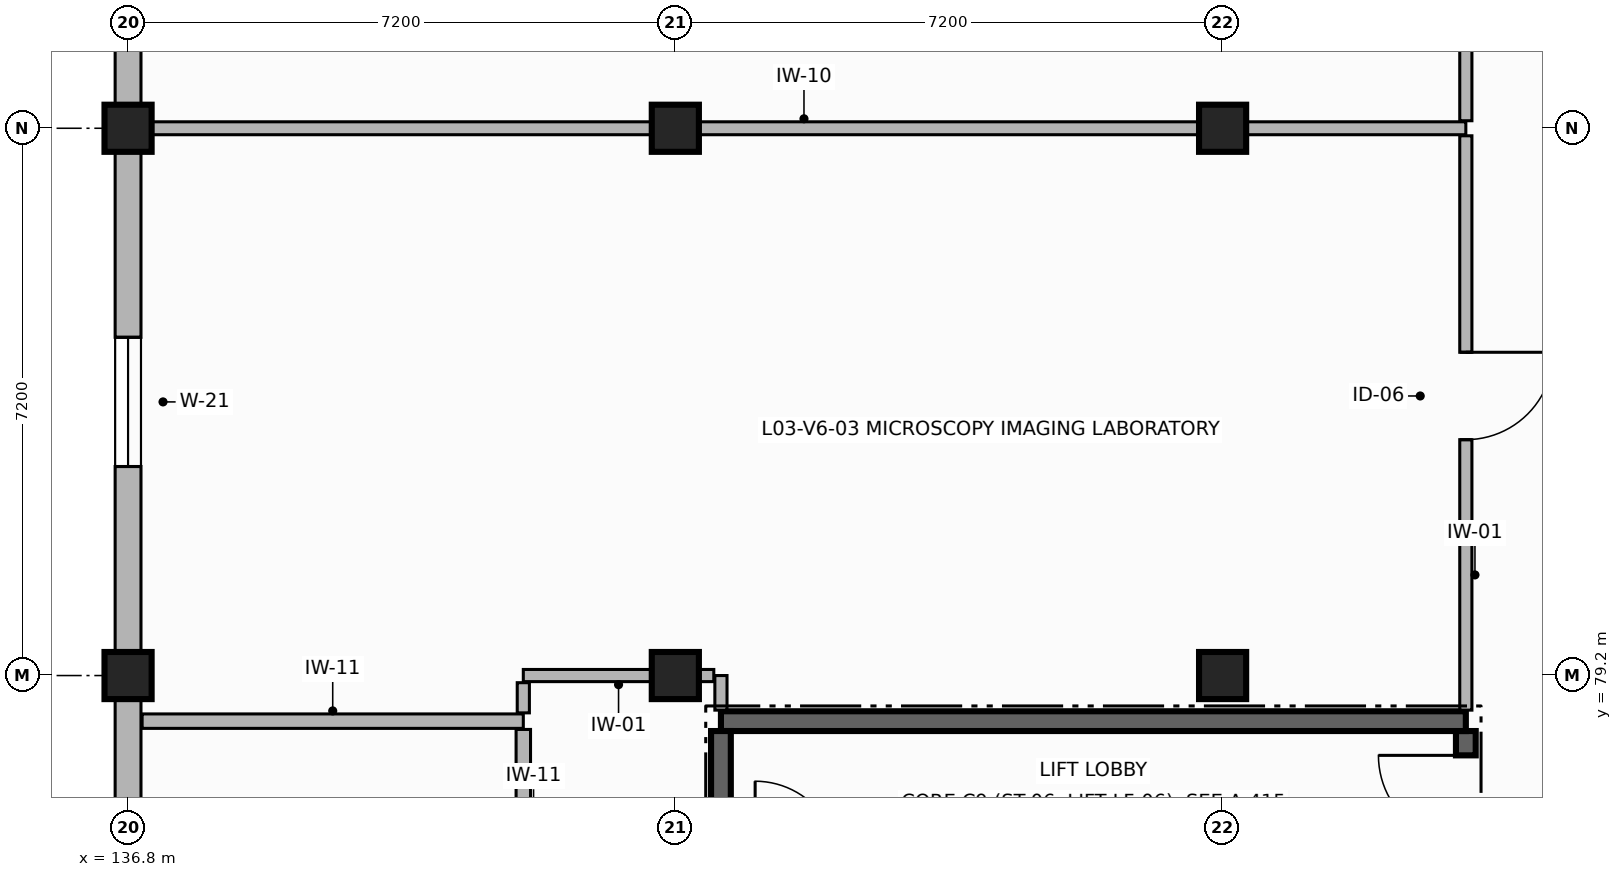
"""IFC4 building model, lengths in metres.
Left out: names, types, materials, properties, quantities, classifications, styles, units other than length and angle.
Written with IfcOpenShell. Run it as: python <this file> out.ifc"""

import sys

from ifc_helpers import new_model, si_unit, direction, frame, frame_2d, origin, origin_2d, place, context, subcontext, project, spatial, rectangle, extrude, element, fill, save


model = new_model("IFC4")
c1 = context("Model", 3, precision=1e-05, world=origin(), true_north=direction((0.0, 1.0)))
c2 = subcontext(c1, "Body", "Model", "MODEL_VIEW")
j1 = project(units=[si_unit("LENGTHUNIT", "METRE"), si_unit("PLANEANGLEUNIT", "RADIAN")], contexts=[c1])
p1 = place(None, origin())
s1 = spatial("IfcSite", under=j1, at=p1, CompositionType="ELEMENT")
p2 = place(p1, origin())
s2 = spatial("IfcBuilding", under=s1, at=p2, CompositionType="ELEMENT")
p3 = place(p2, frame((0.0, 0.0, 12.3)))
s3 = spatial("IfcBuildingStorey", under=s2, at=p3, CompositionType="ELEMENT", Elevation=12.3)
for number, where, z_axis, x_axis in (
    (1, (136.8, 79.2, 0.0), (0.0, 0.0, 1.0), (1.0, 0.0, 0.0)),
    (2, (136.8, 86.4, 0.0), (0.0, 0.0, 1.0), (1.0, 0.0, 0.0)),
    (3, (144.0, 79.2, 0.0), (0.0, 0.0, 1.0), (1.0, 0.0, 0.0)),
    (4, (144.0, 86.4, 0.0), (0.0, 0.0, 1.0), (1.0, 0.0, 0.0)),
    (5, (151.2, 79.2, 0.0), (0.0, 0.0, 1.0), (1.0, 0.0, 0.0)),
    (6, (151.2, 86.4, 0.0), (0.0, 0.0, 1.0), (1.0, 0.0, 0.0)),
):
    element("IfcColumn", number, at=place(p3, frame(where, z_axis=z_axis, x_axis=x_axis)), inside=s3, PredefinedType="COLUMN", context=c2, shape_type="SweptSolid", body=[
        extrude(rectangle(XDim=0.62, YDim=0.62, at=origin_2d()), origin(), (0.0, 0.0, 1.0), 3.38),
    ])
p4 = place(p3, frame((136.8, 93.6, 0.0), z_axis=(0.0, 0.0, 1.0), x_axis=(0.0, -1.0, 0.0)))
e7 = element("IfcWall", 7, at=p4, inside=s3, PredefinedType="SOLIDWALL", context=c2, shape_type="SweptSolid", body=[
    extrude(rectangle(XDim=7.2, YDim=0.34, at=frame_2d((3.6, 0.0))), origin(), (0.0, 0.0, 1.0), 2.71),
])
p5 = place(p4, frame((2.75, 0.0, 0.85)))
e8 = element("IfcOpeningElement", 8, at=p5, cuts=e7, PredefinedType="OPENING", context=c2, shape_type="SweptSolid", body=[
    extrude(rectangle(XDim=1.7, YDim=1.65, at=frame_2d((0.85, 0.825))), frame((0.0, 0.18, 0.0), z_axis=(0.0, -1.0, 0.0), x_axis=(1.0, 0.0, 0.0)), (0.0, 0.0, 1.0), 0.36),
])
p6 = place(p3, frame((136.8, 86.4, 0.0), z_axis=(0.0, 0.0, 1.0), x_axis=(0.0, -1.0, 0.0)))
e9 = element("IfcWall", 9, at=p6, inside=s3, PredefinedType="SOLIDWALL", context=c2, shape_type="SweptSolid", body=[
    extrude(rectangle(XDim=7.2, YDim=0.34, at=frame_2d((3.6, 0.0))), origin(), (0.0, 0.0, 1.0), 2.71),
])
p7 = place(p6, frame((2.75, 0.0, 0.85)))
e10 = element("IfcOpeningElement", 10, at=p7, cuts=e9, PredefinedType="OPENING", context=c2, shape_type="SweptSolid", body=[
    extrude(rectangle(XDim=1.7, YDim=1.65, at=frame_2d((0.85, 0.825))), frame((0.0, 0.18, 0.0), z_axis=(0.0, -1.0, 0.0), x_axis=(1.0, 0.0, 0.0)), (0.0, 0.0, 1.0), 0.36),
])
p8 = place(p3, frame((136.8, 79.2, 0.0), z_axis=(0.0, 0.0, 1.0), x_axis=(0.0, -1.0, 0.0)))
e11 = element("IfcWall", 11, at=p8, inside=s3, PredefinedType="SOLIDWALL", context=c2, shape_type="SweptSolid", body=[
    extrude(rectangle(XDim=7.2, YDim=0.34, at=frame_2d((3.6, 0.0))), origin(), (0.0, 0.0, 1.0), 2.71),
])
p9 = place(p8, frame((2.65, 0.0, 0.85)))
e12 = element("IfcOpeningElement", 12, at=p9, cuts=e11, PredefinedType="OPENING", context=c2, shape_type="SweptSolid", body=[
    extrude(rectangle(XDim=1.7, YDim=1.65, at=frame_2d((0.85, 0.825))), frame((0.0, 0.18, 0.0), z_axis=(0.0, -1.0, 0.0), x_axis=(1.0, 0.0, 0.0)), (0.0, 0.0, 1.0), 0.36),
])
p10 = place(p3, frame((154.4, 72.93, 0.0), z_axis=(0.0, 0.0, 1.0), x_axis=(0.0, 1.0, 0.0)))
e13 = element("IfcWall", 13, at=p10, inside=s3, PredefinedType="SHEAR", context=c2, shape_type="SweptSolid", body=[
    extrude(rectangle(XDim=5.54, YDim=0.26, at=frame_2d((2.77, 0.0))), origin(), (0.0, 0.0, 1.0), 3.38),
])
p11 = place(p10, frame((4.07, 0.0, 0.0)))
e14 = element("IfcOpeningElement", 14, at=p11, cuts=e13, PredefinedType="OPENING", context=c2, shape_type="SweptSolid", body=[
    extrude(rectangle(XDim=1.15, YDim=2.2, at=frame_2d((0.575, 1.1))), frame((0.0, 0.14, 0.0), z_axis=(0.0, -1.0, 0.0), x_axis=(1.0, 0.0, 0.0)), (0.0, 0.0, 1.0), 0.28),
])
p12 = place(p3, frame((154.4, 78.6, 0.0), z_axis=(0.0, 0.0, 1.0), x_axis=(-1.0, 0.0, 0.0)))
e15 = element("IfcWall", 15, at=p12, inside=s3, PredefinedType="SHEAR", context=c2, shape_type="SweptSolid", body=[
    extrude(rectangle(XDim=9.8, YDim=0.26, at=frame_2d((4.9, 0.0))), origin(), (0.0, 0.0, 1.0), 3.38),
])
p13 = place(p3, frame((144.6, 78.47, 0.0), z_axis=(0.0, 0.0, 1.0), x_axis=(0.0, -1.0, 0.0)))
e16 = element("IfcWall", 16, at=p13, inside=s3, PredefinedType="SHEAR", context=c2, shape_type="SweptSolid", body=[
    extrude(rectangle(XDim=5.54, YDim=0.26, at=frame_2d((2.77, 0.0))), origin(), (0.0, 0.0, 1.0), 3.38),
])
p14 = place(p3, frame((136.985, 78.6, 0.0), z_axis=(0.0, 0.0, 1.0), x_axis=(1.0, 0.0, 0.0)))
e17 = element("IfcWall", 17, at=p14, inside=s3, PredefinedType="PARTITIONING", context=c2, shape_type="SweptSolid", body=[
    extrude(rectangle(XDim=5.015, YDim=0.19, at=frame_2d((2.507, 0.0))), origin(), (0.0, 0.0, 1.0), 2.69),
])
p15 = place(p3, frame((142.0, 78.491, 0.0), z_axis=(0.0, 0.0, 1.0), x_axis=(0.0, -1.0, 0.0)))
e18 = element("IfcWall", 18, at=p15, inside=s3, PredefinedType="PARTITIONING", context=c2, shape_type="SweptSolid", body=[
    extrude(rectangle(XDim=5.592, YDim=0.19, at=frame_2d((2.796, 0.0))), origin(), (0.0, 0.0, 1.0), 2.69),
])
p16 = place(p15, frame((2.337, 0.0, 0.0)))
e19 = element("IfcOpeningElement", 19, at=p16, cuts=e18, PredefinedType="OPENING", context=c2, shape_type="SweptSolid", body=[
    extrude(rectangle(XDim=1.15, YDim=2.25, at=frame_2d((0.575, 1.125))), frame((0.0, 0.105, 0.0), z_axis=(0.0, -1.0, 0.0), x_axis=(1.0, 0.0, 0.0)), (0.0, 0.0, 1.0), 0.21),
])
p17 = place(p3, frame((144.6, 78.745, 0.0), z_axis=(0.0, 0.0, 1.0), x_axis=(0.0, 1.0, 0.0)))
e20 = element("IfcWall", 20, at=p17, inside=s3, PredefinedType="PARTITIONING", context=c2, shape_type="SweptSolid", body=[
    extrude(rectangle(XDim=0.455, YDim=0.16, at=frame_2d((0.228, 0.0))), origin(), (0.0, 0.0, 1.0), 2.69),
])
p18 = place(p3, frame((144.506, 79.2, 0.0), z_axis=(0.0, 0.0, 1.0), x_axis=(-1.0, 0.0, 0.0)))
e21 = element("IfcWall", 21, at=p18, inside=s3, PredefinedType="PARTITIONING", context=c2, shape_type="SweptSolid", body=[
    extrude(rectangle(XDim=2.506, YDim=0.16, at=frame_2d((1.253, 0.0))), origin(), (0.0, 0.0, 1.0), 2.69),
])
p19 = place(p3, frame((142.0, 79.106, 0.0), z_axis=(0.0, 0.0, 1.0), x_axis=(0.0, -1.0, 0.0)))
e22 = element("IfcWall", 22, at=p19, inside=s3, PredefinedType="PARTITIONING", context=c2, shape_type="SweptSolid", body=[
    extrude(rectangle(XDim=0.397, YDim=0.16, at=frame_2d((0.198, 0.0))), origin(), (0.0, 0.0, 1.0), 2.69),
])
p20 = place(p3, frame((136.985, 86.4, 0.0), z_axis=(0.0, 0.0, 1.0), x_axis=(1.0, 0.0, 0.0)))
e23 = element("IfcWall", 23, at=p20, inside=s3, PredefinedType="PARTITIONING", context=c2, shape_type="SweptSolid", body=[
    extrude(rectangle(XDim=17.415, YDim=0.17, at=frame_2d((8.708, 0.0))), origin(), (0.0, 0.0, 1.0), 2.69),
])
p21 = place(p3, frame((154.4, 86.301, 0.0), z_axis=(0.0, 0.0, 1.0), x_axis=(0.0, -1.0, 0.0)))
e24 = element("IfcWall", 24, at=p21, inside=s3, PredefinedType="PARTITIONING", context=c2, shape_type="SweptSolid", body=[
    extrude(rectangle(XDim=7.556, YDim=0.16, at=frame_2d((3.778, 0.0))), origin(), (0.0, 0.0, 1.0), 2.69),
])
p22 = place(p21, frame((2.848, 0.0, 0.0)))
e25 = element("IfcOpeningElement", 25, at=p22, cuts=e24, PredefinedType="OPENING", context=c2, shape_type="SweptSolid", body=[
    extrude(rectangle(XDim=1.15, YDim=2.25, at=frame_2d((0.575, 1.125))), frame((0.0, 0.09, 0.0), z_axis=(0.0, -1.0, 0.0), x_axis=(1.0, 0.0, 0.0)), (0.0, 0.0, 1.0), 0.18),
])
p23 = place(p3, frame((154.4, 93.521, 0.0), z_axis=(0.0, 0.0, 1.0), x_axis=(0.0, -1.0, 0.0)))
e26 = element("IfcWall", 26, at=p23, inside=s3, PredefinedType="PARTITIONING", context=c2, shape_type="SweptSolid", body=[
    extrude(rectangle(XDim=7.022, YDim=0.16, at=frame_2d((3.511, 0.0))), origin(), (0.0, 0.0, 1.0), 2.69),
])
p24 = place(p23, frame((3.001, 0.0, 0.0)))
e27 = element("IfcOpeningElement", 27, at=p24, cuts=e26, PredefinedType="OPENING", context=c2, shape_type="SweptSolid", body=[
    extrude(rectangle(XDim=1.02, YDim=2.15, at=frame_2d((0.51, 1.075))), frame((0.0, 0.09, 0.0), z_axis=(0.0, -1.0, 0.0), x_axis=(1.0, 0.0, 0.0)), (0.0, 0.0, 1.0), 0.18),
])
p25 = place(p7, origin())
e28 = element("IfcWindow", 28, at=p25, inside=s3, PartitioningType="SINGLE_PANEL", PredefinedType="WINDOW", context=c2, shape_type="SweptSolid", body=[
    extrude(rectangle(XDim=1.7, YDim=1.65, at=frame_2d((0.85, 0.825))), frame((0.0, 0.03, 0.0), z_axis=(0.0, -1.0, 0.0), x_axis=(1.0, 0.0, 0.0)), (0.0, 0.0, 1.0), 0.06),
])
fill(e10, e28)
p26 = place(p11, origin())
e29 = element("IfcDoor", 29, at=p26, inside=s3, OperationType="SINGLE_SWING_RIGHT", PredefinedType="DOOR", context=c2, shape_type="SweptSolid", body=[
    extrude(rectangle(XDim=1.15, YDim=2.2, at=frame_2d((0.575, 1.1))), frame((0.0, 0.025, 0.0), z_axis=(0.0, -1.0, 0.0), x_axis=(1.0, 0.0, 0.0)), (0.0, 0.0, 1.0), 0.05),
])
fill(e14, e29)
p27 = place(p22, origin())
e30 = element("IfcDoor", 30, at=p27, inside=s3, OperationType="SINGLE_SWING_LEFT", PredefinedType="DOOR", context=c2, shape_type="SweptSolid", body=[
    extrude(rectangle(XDim=1.15, YDim=2.25, at=frame_2d((0.575, 1.125))), frame((0.0, 0.025, 0.0), z_axis=(0.0, -1.0, 0.0), x_axis=(1.0, 0.0, 0.0)), (0.0, 0.0, 1.0), 0.05),
])
fill(e25, e30)
save(model, sys.argv[1])
